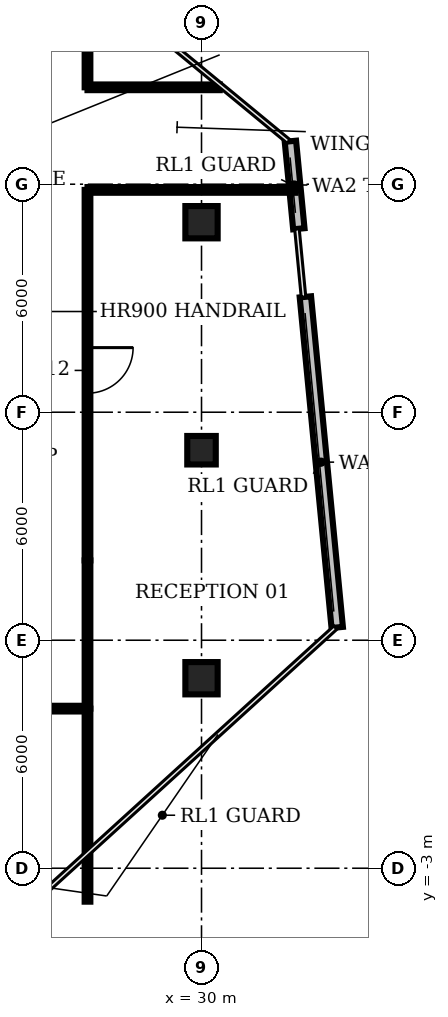
"""IFC4 building model, lengths in metres.
Left out: names, types, materials, properties, quantities, classifications, styles, units other than length and angle.
Written with IfcOpenShell. Run it as: python <this file> out.ifc"""

import sys

from ifc_helpers import new_model, si_unit, direction, frame, frame_2d, origin, origin_2d, place, context, subcontext, project, spatial, rectangle, circle, extrude, element, fill, save


model = new_model("IFC4")
c1 = context("Model", 3, precision=1e-05, world=origin(), true_north=direction((0.0, 1.0)))
c2 = subcontext(c1, "Body", "Model", "MODEL_VIEW")
j1 = project(units=[si_unit("LENGTHUNIT", "METRE"), si_unit("PLANEANGLEUNIT", "RADIAN")], contexts=[c1])
p1 = place(None, origin())
s1 = spatial("IfcSite", under=j1, at=p1, CompositionType="ELEMENT")
p2 = place(p1, origin())
s2 = spatial("IfcBuilding", under=s1, at=p2, CompositionType="ELEMENT")
p3 = place(p2, frame((0.0, 0.0, 310.4)))
s3 = spatial("IfcBuildingStorey", under=s2, at=p3, CompositionType="ELEMENT", Elevation=310.4)
p4 = place(p3, frame((30.0, 2.0, 0.0), z_axis=(0.0, 0.0, 1.0), x_axis=(1.0, 0.0, 0.0)))
e1 = element("IfcColumn", 1, at=p4, inside=s3, PredefinedType="COLUMN", context=c2, shape_type="SweptSolid", body=[
    extrude(circle(Radius=0.425, at=origin_2d()), origin(), (0.0, 0.0, 1.0), 3.9),
])
p5 = place(p3, frame((30.0, 8.0, 0.0), z_axis=(0.0, 0.0, 1.0), x_axis=(1.0, 0.0, 0.0)))
e2 = element("IfcColumn", 2, at=p5, inside=s3, PredefinedType="COLUMN", context=c2, shape_type="SweptSolid", body=[
    extrude(rectangle(XDim=0.75, YDim=0.75, at=origin_2d()), origin(), (0.0, 0.0, 1.0), 3.9),
])
p6 = place(p3, frame((30.0, 14.0, 0.0), z_axis=(0.0, 0.0, 1.0), x_axis=(1.0, 0.0, 0.0)))
e3 = element("IfcColumn", 3, at=p6, inside=s3, PredefinedType="COLUMN", context=c2, shape_type="SweptSolid", body=[
    extrude(circle(Radius=0.425, at=origin_2d()), origin(), (0.0, 0.0, 1.0), 3.9),
])
p7 = place(p3, frame((33.571, 3.336, 0.0), z_axis=(0.0, 0.0, 1.0), x_axis=(-0.095841215008, 0.995396635269, 0.0)))
e4 = element("IfcWall", 4, at=p7, inside=s3, PredefinedType="SOLIDWALL", context=c2, shape_type="SweptSolid", body=[
    extrude(rectangle(XDim=8.74, YDim=0.3, at=frame_2d((4.37, 0.0))), origin(), (0.0, 0.0, 1.0), 3.9),
])
p8 = place(p3, frame((32.561, 13.828, 0.0), z_axis=(0.0, 0.0, 1.0), x_axis=(-0.095825017052, 0.995398194748, 0.0)))
e5 = element("IfcWall", 5, at=p8, inside=s3, PredefinedType="SOLIDWALL", context=c2, shape_type="SweptSolid", body=[
    extrude(rectangle(XDim=2.313, YDim=0.3, at=frame_2d((1.157, 0.0))), origin(), (0.0, 0.0, 1.0), 3.9),
])
p9 = place(p3, frame((27.0, -3.88, 0.0), z_axis=(0.0, 0.0, 1.0), x_axis=(0.0, 1.0, 0.0)))
e6 = element("IfcWall", 6, at=p9, inside=s3, PredefinedType="PARTITIONING", context=c2, shape_type="SweptSolid", body=[
    extrude(rectangle(XDim=5.08, YDim=0.15, at=frame_2d((2.54, 0.0))), origin(), (0.0, 0.0, 1.0), 2.48),
])
p10 = place(p3, frame((27.0, 1.2, 0.0), z_axis=(0.0, 0.0, 1.0), x_axis=(-1.0, 0.0, 0.0)))
e7 = element("IfcWall", 7, at=p10, inside=s3, PredefinedType="PARTITIONING", context=c2, shape_type="SweptSolid", body=[
    extrude(rectangle(XDim=24.0, YDim=0.15, at=frame_2d((12.0, 0.0))), origin(), (0.0, 0.0, 1.0), 2.48),
])
p11 = place(p10, frame((11.5, 0.0, 0.0)))
e8 = element("IfcOpeningElement", 8, at=p11, cuts=e7, PredefinedType="OPENING", context=c2, shape_type="SweptSolid", body=[
    extrude(rectangle(XDim=1.2, YDim=2.1, at=frame_2d((0.6, 1.05))), frame((0.0, 0.085, 0.0), z_axis=(0.0, -1.0, 0.0), x_axis=(1.0, 0.0, 0.0)), (0.0, 0.0, 1.0), 0.17),
])
p12 = place(p3, frame((27.0, 1.2, 0.0), z_axis=(0.0, 0.0, 1.0), x_axis=(0.0, 1.0, 0.0)))
e9 = element("IfcWall", 9, at=p12, inside=s3, PredefinedType="PARTITIONING", context=c2, shape_type="SweptSolid", body=[
    extrude(rectangle(XDim=3.9, YDim=0.15, at=frame_2d((1.95, 0.0))), origin(), (0.0, 0.0, 1.0), 2.48),
])
p13 = place(p3, frame((27.0, 14.85, 0.0), z_axis=(0.0, 0.0, 1.0), x_axis=(0.0, -1.0, 0.0)))
e10 = element("IfcWall", 10, at=p13, inside=s3, PredefinedType="PARTITIONING", context=c2, shape_type="SweptSolid", body=[
    extrude(rectangle(XDim=9.75, YDim=0.15, at=frame_2d((4.875, 0.0))), origin(), (0.0, 0.0, 1.0), 2.48),
])
p14 = place(p13, frame((4.15, 0.0, 0.0)))
e11 = element("IfcOpeningElement", 11, at=p14, cuts=e10, PredefinedType="OPENING", context=c2, shape_type="SweptSolid", body=[
    extrude(rectangle(XDim=1.2, YDim=2.1, at=frame_2d((0.6, 1.05))), frame((0.0, 0.085, 0.0), z_axis=(0.0, -1.0, 0.0), x_axis=(1.0, 0.0, 0.0)), (0.0, 0.0, 1.0), 0.17),
])
p15 = place(p3, frame((27.0, 14.85, 0.0), z_axis=(0.0, 0.0, 1.0), x_axis=(1.0, 0.0, 0.0)))
e12 = element("IfcWall", 12, at=p15, inside=s3, PredefinedType="PARTITIONING", context=c2, shape_type="SweptSolid", body=[
    extrude(rectangle(XDim=5.473, YDim=0.15, at=frame_2d((2.736, 0.0))), origin(), (0.0, 0.0, 1.0), 2.48),
])
p16 = place(p3, frame((27.0, 17.55, 0.0), z_axis=(0.0, 0.0, 1.0), x_axis=(0.0, 1.0, 0.0)))
e13 = element("IfcWall", 13, at=p16, inside=s3, PredefinedType="PARTITIONING", context=c2, shape_type="SweptSolid", body=[
    extrude(rectangle(XDim=2.87, YDim=0.15, at=frame_2d((1.435, 0.0))), origin(), (0.0, 0.0, 1.0), 2.48),
])
p17 = place(p3, frame((27.0, 17.55, 0.0), z_axis=(0.0, 0.0, 1.0), x_axis=(1.0, 0.0, 0.0)))
e14 = element("IfcWall", 14, at=p17, inside=s3, PredefinedType="PARTITIONING", context=c2, shape_type="SweptSolid", body=[
    extrude(rectangle(XDim=3.48, YDim=0.15, at=frame_2d((1.74, 0.0))), origin(), (0.0, 0.0, 1.0), 2.48),
])
p18 = place(p14, origin())
e15 = element("IfcDoor", 15, at=p18, inside=s3, OperationType="SINGLE_SWING_LEFT", PredefinedType="DOOR", context=c2, shape_type="SweptSolid", body=[
    extrude(rectangle(XDim=1.2, YDim=2.1, at=frame_2d((0.6, 1.05))), frame((0.0, 0.025, 0.0), z_axis=(0.0, -1.0, 0.0), x_axis=(1.0, 0.0, 0.0)), (0.0, 0.0, 1.0), 0.05),
])
fill(e11, e15)
save(model, sys.argv[1])
